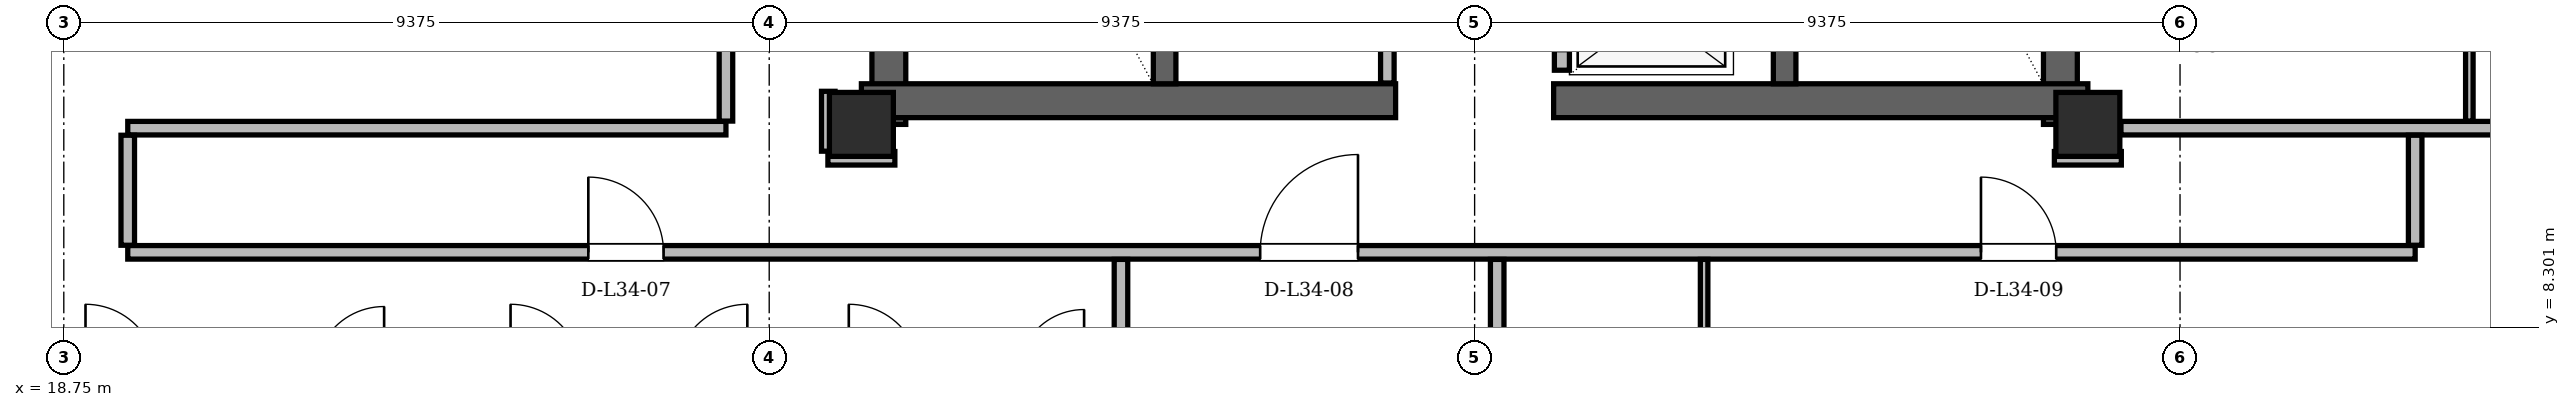
"""IFC4 building model, lengths in metres.
Left out: names, types, materials, properties, quantities, classifications, styles, units other than length and angle.
Written with IfcOpenShell. Run it as: python <this file> out.ifc"""

import sys

from ifc_helpers import new_model, si_unit, direction, frame, frame_2d, origin, origin_2d, place, context, subcontext, project, spatial, rectangle, hollow_rectangle, extrude, element, fill, save


model = new_model("IFC4")
c1 = context("Model", 3, precision=1e-05, world=origin(), true_north=direction((0.0, 1.0)))
c2 = subcontext(c1, "Body", "Model", "MODEL_VIEW")
j1 = project(units=[si_unit("LENGTHUNIT", "METRE"), si_unit("PLANEANGLEUNIT", "RADIAN")], contexts=[c1])
p1 = place(None, origin())
s1 = spatial("IfcSite", under=j1, at=p1, CompositionType="ELEMENT")
p2 = place(p1, origin())
s2 = spatial("IfcBuilding", under=s1, at=p2, CompositionType="ELEMENT")
p3 = place(p2, frame((0.0, 0.0, 130.2)))
s3 = spatial("IfcBuildingStorey", under=s2, at=p3, CompositionType="ELEMENT", Elevation=130.2)
for number, where, z_axis, x_axis in (
    (1, (29.35, 11.0, 0.0), (0.0, 0.0, 1.0), (1.0, 0.0, 0.0)),
    (2, (45.65, 11.0, 0.0), (0.0, 0.0, 1.0), (1.0, 0.0, 0.0)),
):
    element("IfcColumn", number, at=place(p3, frame(where, z_axis=z_axis, x_axis=x_axis)), inside=s3, PredefinedType="COLUMN", context=c2, shape_type="SweptSolid", body=[
        extrude(hollow_rectangle(XDim=0.85, YDim=0.85, WallThickness=0.07, at=origin_2d()), origin(), (0.0, 0.0, 1.0), 3.6),
    ])
for number, where, z_axis, x_axis in (
    (3, (29.715, 11.0, 0.0), (0.0, 0.0, 1.0), (0.0, 1.0, 0.0)),
    (4, (45.285, 11.0, 0.0), (0.0, 0.0, 1.0), (0.0, 1.0, 0.0)),
):
    element("IfcWall", number, at=place(p3, frame(where, z_axis=z_axis, x_axis=x_axis)), inside=s3, PredefinedType="SHEAR", context=c2, shape_type="SweptSolid", body=[
        extrude(rectangle(XDim=13.3, YDim=0.45, at=frame_2d((6.65, 0.0))), origin(), (0.0, 0.0, 1.0), 3.34),
    ])
for number, where, z_axis, x_axis in (
    (5, (29.35, 11.315, 0.0), (0.0, 0.0, 1.0), (1.0, 0.0, 0.0)),
    (6, (38.55, 11.315, 0.0), (0.0, 0.0, 1.0), (1.0, 0.0, 0.0)),
):
    element("IfcWall", number, at=place(p3, frame(where, z_axis=z_axis, x_axis=x_axis)), inside=s3, PredefinedType="SHEAR", context=c2, shape_type="SweptSolid", body=[
        extrude(rectangle(XDim=7.1, YDim=0.45, at=frame_2d((3.55, 0.0))), origin(), (0.0, 0.0, 1.0), 3.34),
    ])
for number, where, z_axis, x_axis in (
    (7, (33.38, 11.54, 0.0), (0.0, 0.0, 1.0), (0.0, 1.0, 0.0)),
    (8, (41.62, 11.54, 0.0), (0.0, 0.0, 1.0), (0.0, 1.0, 0.0)),
):
    element("IfcWall", number, at=place(p3, frame(where, z_axis=z_axis, x_axis=x_axis)), inside=s3, PredefinedType="SHEAR", context=c2, shape_type="SweptSolid", body=[
        extrude(rectangle(XDim=7.62, YDim=0.3, at=frame_2d((3.81, 0.0))), origin(), (0.0, 0.0, 1.0), 3.34),
    ])
p4 = place(p3, frame((14.742, 12.962, 0.0), z_axis=(0.0, 0.0, 1.0), x_axis=(0.499998958472, -0.86602600511, 0.0)))
e9 = element("IfcWall", 9, at=p4, inside=s3, PredefinedType="SOLIDWALL", context=c2, shape_type="SweptSolid", body=[
    extrude(rectangle(XDim=10.395, YDim=0.34, at=frame_2d((5.197, 0.0))), origin(), (0.0, 0.0, 1.0), 2.558),
])
p5 = place(p3, frame((36.34, 11.55, 0.0), z_axis=(0.0, 0.0, 1.0), x_axis=(0.0, 1.0, 0.0)))
e10 = element("IfcWall", 10, at=p5, inside=s3, PredefinedType="PARTITIONING", context=c2, shape_type="SweptSolid", body=[
    extrude(rectangle(XDim=5.55, YDim=0.18, at=frame_2d((2.775, 0.0))), origin(), (0.0, 0.0, 1.0), 3.34),
])
p6 = place(p5, frame((2.85, 0.0, 0.0)))
e11 = element("IfcOpeningElement", 11, at=p6, cuts=e10, PredefinedType="OPENING", context=c2, shape_type="SweptSolid", body=[
    extrude(rectangle(XDim=0.95, YDim=2.1, at=frame_2d((0.475, 1.05))), frame((0.0, 0.09, 0.0), z_axis=(0.0, -1.0, 0.0), x_axis=(1.0, 0.0, 0.0)), (0.0, 0.0, 1.0), 0.18),
])
p7 = place(p3, frame((38.66, 11.72, 0.0), z_axis=(0.0, 0.0, 1.0), x_axis=(0.0, 1.0, 0.0)))
e12 = element("IfcWall", 12, at=p7, inside=s3, PredefinedType="PARTITIONING", context=c2, shape_type="SweptSolid", body=[
    extrude(rectangle(XDim=9.1, YDim=0.2, at=frame_2d((4.55, 0.0))), origin(), (0.0, 0.0, 1.0), 3.34),
])
p8 = place(p7, frame((0.255, 0.0, 0.0)))
e13 = element("IfcOpeningElement", 13, at=p8, cuts=e12, PredefinedType="OPENING", context=c2, shape_type="SweptSolid", body=[
    extrude(rectangle(XDim=1.05, YDim=2.15, at=frame_2d((0.525, 1.075))), frame((0.0, 0.1, 0.0), z_axis=(0.0, -1.0, 0.0), x_axis=(1.0, 0.0, 0.0)), (0.0, 0.0, 1.0), 0.2),
])
p9 = place(p7, frame((2.105, 0.0, 0.0)))
e14 = element("IfcOpeningElement", 14, at=p9, cuts=e12, PredefinedType="OPENING", context=c2, shape_type="SweptSolid", body=[
    extrude(rectangle(XDim=1.05, YDim=2.15, at=frame_2d((0.525, 1.075))), frame((0.0, 0.1, 0.0), z_axis=(0.0, -1.0, 0.0), x_axis=(1.0, 0.0, 0.0)), (0.0, 0.0, 1.0), 0.2),
])
p10 = place(p7, frame((3.955, 0.0, 0.0)))
e15 = element("IfcOpeningElement", 15, at=p10, cuts=e12, PredefinedType="OPENING", context=c2, shape_type="SweptSolid", body=[
    extrude(rectangle(XDim=1.05, YDim=2.15, at=frame_2d((0.525, 1.075))), frame((0.0, 0.1, 0.0), z_axis=(0.0, -1.0, 0.0), x_axis=(1.0, 0.0, 0.0)), (0.0, 0.0, 1.0), 0.2),
])
p11 = place(p3, frame((19.6, 9.3, 0.0), z_axis=(0.0, 0.0, 1.0), x_axis=(1.0, 0.0, 0.0)))
e16 = element("IfcWall", 16, at=p11, inside=s3, PredefinedType="PARTITIONING", context=c2, shape_type="SweptSolid", body=[
    extrude(rectangle(XDim=30.4, YDim=0.18, at=frame_2d((15.2, 0.0))), origin(), (0.0, 0.0, 1.0), 2.794),
])
p12 = place(p11, frame((6.121, 0.0, 0.0)))
e17 = element("IfcOpeningElement", 17, at=p12, cuts=e16, PredefinedType="OPENING", context=c2, shape_type="SweptSolid", body=[
    extrude(rectangle(XDim=1.0, YDim=2.18, at=frame_2d((0.5, 1.09))), frame((0.0, 0.09, 0.0), z_axis=(0.0, -1.0, 0.0), x_axis=(1.0, 0.0, 0.0)), (0.0, 0.0, 1.0), 0.18),
])
p13 = place(p11, frame((15.05, 0.0, 0.0)))
e18 = element("IfcOpeningElement", 18, at=p13, cuts=e16, PredefinedType="OPENING", context=c2, shape_type="SweptSolid", body=[
    extrude(rectangle(XDim=1.3, YDim=2.2, at=frame_2d((0.65, 1.1))), frame((0.0, 0.09, 0.0), z_axis=(0.0, -1.0, 0.0), x_axis=(1.0, 0.0, 0.0)), (0.0, 0.0, 1.0), 0.18),
])
p14 = place(p11, frame((24.629, 0.0, 0.0)))
e19 = element("IfcOpeningElement", 19, at=p14, cuts=e16, PredefinedType="OPENING", context=c2, shape_type="SweptSolid", body=[
    extrude(rectangle(XDim=1.0, YDim=2.18, at=frame_2d((0.5, 1.09))), frame((0.0, 0.09, 0.0), z_axis=(0.0, -1.0, 0.0), x_axis=(1.0, 0.0, 0.0)), (0.0, 0.0, 1.0), 0.18),
])
for number, where, z_axis, x_axis in (
    (20, (28.905, 10.55, 0.0), (0.0, 0.0, 1.0), (1.0, 0.0, 0.0)),
    (21, (45.205, 10.55, 0.0), (0.0, 0.0, 1.0), (1.0, 0.0, 0.0)),
):
    element("IfcWall", number, at=place(p3, frame(where, z_axis=z_axis, x_axis=x_axis)), inside=s3, PredefinedType="PARTITIONING", context=c2, shape_type="SweptSolid", body=[
        extrude(rectangle(XDim=0.89, YDim=0.18, at=frame_2d((0.445, 0.0))), origin(), (0.0, 0.0, 1.0), 3.34),
    ])
p15 = place(p3, frame((19.6, 10.95, 0.0), z_axis=(0.0, 0.0, 1.0), x_axis=(1.0, 0.0, 0.0)))
e22 = element("IfcWall", 22, at=p15, inside=s3, PredefinedType="PARTITIONING", context=c2, shape_type="SweptSolid", body=[
    extrude(rectangle(XDim=7.95, YDim=0.18, at=frame_2d((3.975, 0.0))), origin(), (0.0, 0.0, 1.0), 3.34),
])
p16 = place(p3, frame((46.09, 10.95, 0.0), z_axis=(0.0, 0.0, 1.0), x_axis=(1.0, 0.0, 0.0)))
e23 = element("IfcWall", 23, at=p16, inside=s3, PredefinedType="PARTITIONING", context=c2, shape_type="SweptSolid", body=[
    extrude(rectangle(XDim=12.805, YDim=0.18, at=frame_2d((6.403, 0.0))), origin(), (0.0, 0.0, 1.0), 2.794),
])
p17 = place(p3, frame((19.6, 9.394, 0.0), z_axis=(0.0, 0.0, 1.0), x_axis=(0.0, 1.0, 0.0)))
e24 = element("IfcWall", 24, at=p17, inside=s3, PredefinedType="PARTITIONING", context=c2, shape_type="SweptSolid", body=[
    extrude(rectangle(XDim=1.462, YDim=0.18, at=frame_2d((0.731, 0.0))), origin(), (0.0, 0.0, 1.0), 3.34),
])
p18 = place(p3, frame((27.55, 11.044, 0.0), z_axis=(0.0, 0.0, 1.0), x_axis=(0.0, 1.0, 0.0)))
e25 = element("IfcWall", 25, at=p18, inside=s3, PredefinedType="PARTITIONING", context=c2, shape_type="SweptSolid", body=[
    extrude(rectangle(XDim=5.662, YDim=0.18, at=frame_2d((2.831, 0.0))), origin(), (0.0, 0.0, 1.0), 2.794),
])
p19 = place(p3, frame((28.91, 10.644, 0.0), z_axis=(0.0, 0.0, 1.0), x_axis=(0.0, 1.0, 0.0)))
e26 = element("IfcWall", 26, at=p19, inside=s3, PredefinedType="PARTITIONING", context=c2, shape_type="SweptSolid", body=[
    extrude(rectangle(XDim=0.796, YDim=0.18, at=frame_2d((0.398, 0.0))), origin(), (0.0, 0.0, 1.0), 2.794),
])
p20 = place(p3, frame((32.8, 5.094, 0.0), z_axis=(0.0, 0.0, 1.0), x_axis=(0.0, 1.0, 0.0)))
e27 = element("IfcWall", 27, at=p20, inside=s3, PredefinedType="PARTITIONING", context=c2, shape_type="SweptSolid", body=[
    extrude(rectangle(XDim=4.112, YDim=0.18, at=frame_2d((2.056, 0.0))), origin(), (0.0, 0.0, 1.0), 2.926),
])
p21 = place(p3, frame((37.8, 5.094, 0.0), z_axis=(0.0, 0.0, 1.0), x_axis=(0.0, 1.0, 0.0)))
e28 = element("IfcWall", 28, at=p21, inside=s3, PredefinedType="PARTITIONING", context=c2, shape_type="SweptSolid", body=[
    extrude(rectangle(XDim=4.112, YDim=0.18, at=frame_2d((2.056, 0.0))), origin(), (0.0, 0.0, 1.0), 3.34),
])
p22 = place(p3, frame((40.55, 4.134, 0.0), z_axis=(0.0, 0.0, 1.0), x_axis=(0.0, 1.0, 0.0)))
e29 = element("IfcWall", 29, at=p22, inside=s3, PredefinedType="PARTITIONING", context=c2, shape_type="SweptSolid", body=[
    extrude(rectangle(XDim=5.072, YDim=0.1, at=frame_2d((2.536, 0.0))), origin(), (0.0, 0.0, 1.0), 3.34),
])
p23 = place(p22, frame((2.131, 0.0, 0.0)))
e30 = element("IfcOpeningElement", 30, at=p23, cuts=e29, PredefinedType="OPENING", context=c2, shape_type="SweptSolid", body=[
    extrude(rectangle(XDim=0.88, YDim=2.08, at=frame_2d((0.44, 1.04))), frame((0.0, 0.05, 0.0), z_axis=(0.0, -1.0, 0.0), x_axis=(1.0, 0.0, 0.0)), (0.0, 0.0, 1.0), 0.1),
])
p24 = place(p3, frame((50.0, 9.394, 0.0), z_axis=(0.0, 0.0, 1.0), x_axis=(0.0, 1.0, 0.0)))
e31 = element("IfcWall", 31, at=p24, inside=s3, PredefinedType="PARTITIONING", context=c2, shape_type="SweptSolid", body=[
    extrude(rectangle(XDim=1.462, YDim=0.18, at=frame_2d((0.731, 0.0))), origin(), (0.0, 0.0, 1.0), 3.34),
])
p25 = place(p3, frame((50.72, 11.044, 0.0), z_axis=(0.0, 0.0, 1.0), x_axis=(0.0, 1.0, 0.0)))
e32 = element("IfcWall", 32, at=p25, inside=s3, PredefinedType="PARTITIONING", context=c2, shape_type="SweptSolid", body=[
    extrude(rectangle(XDim=3.082, YDim=0.1, at=frame_2d((1.541, 0.0))), origin(), (0.0, 0.0, 1.0), 2.794),
])
p26 = place(p12, origin())
e33 = element("IfcDoor", 33, at=p26, inside=s3, OperationType="SINGLE_SWING_LEFT", PredefinedType="DOOR", context=c2, shape_type="SweptSolid", body=[
    extrude(rectangle(XDim=1.0, YDim=2.18, at=frame_2d((0.5, 1.09))), frame((0.0, 0.025, 0.0), z_axis=(0.0, -1.0, 0.0), x_axis=(1.0, 0.0, 0.0)), (0.0, 0.0, 1.0), 0.05),
])
fill(e17, e33)
p27 = place(p13, origin())
e34 = element("IfcDoor", 34, at=p27, inside=s3, OperationType="SINGLE_SWING_RIGHT", PredefinedType="DOOR", context=c2, shape_type="SweptSolid", body=[
    extrude(rectangle(XDim=1.3, YDim=2.2, at=frame_2d((0.65, 1.1))), frame((0.0, 0.025, 0.0), z_axis=(0.0, -1.0, 0.0), x_axis=(1.0, 0.0, 0.0)), (0.0, 0.0, 1.0), 0.05),
])
fill(e18, e34)
p28 = place(p14, origin())
e35 = element("IfcDoor", 35, at=p28, inside=s3, OperationType="SINGLE_SWING_LEFT", PredefinedType="DOOR", context=c2, shape_type="SweptSolid", body=[
    extrude(rectangle(XDim=1.0, YDim=2.18, at=frame_2d((0.5, 1.09))), frame((0.0, 0.025, 0.0), z_axis=(0.0, -1.0, 0.0), x_axis=(1.0, 0.0, 0.0)), (0.0, 0.0, 1.0), 0.05),
])
fill(e19, e35)
save(model, sys.argv[1])
